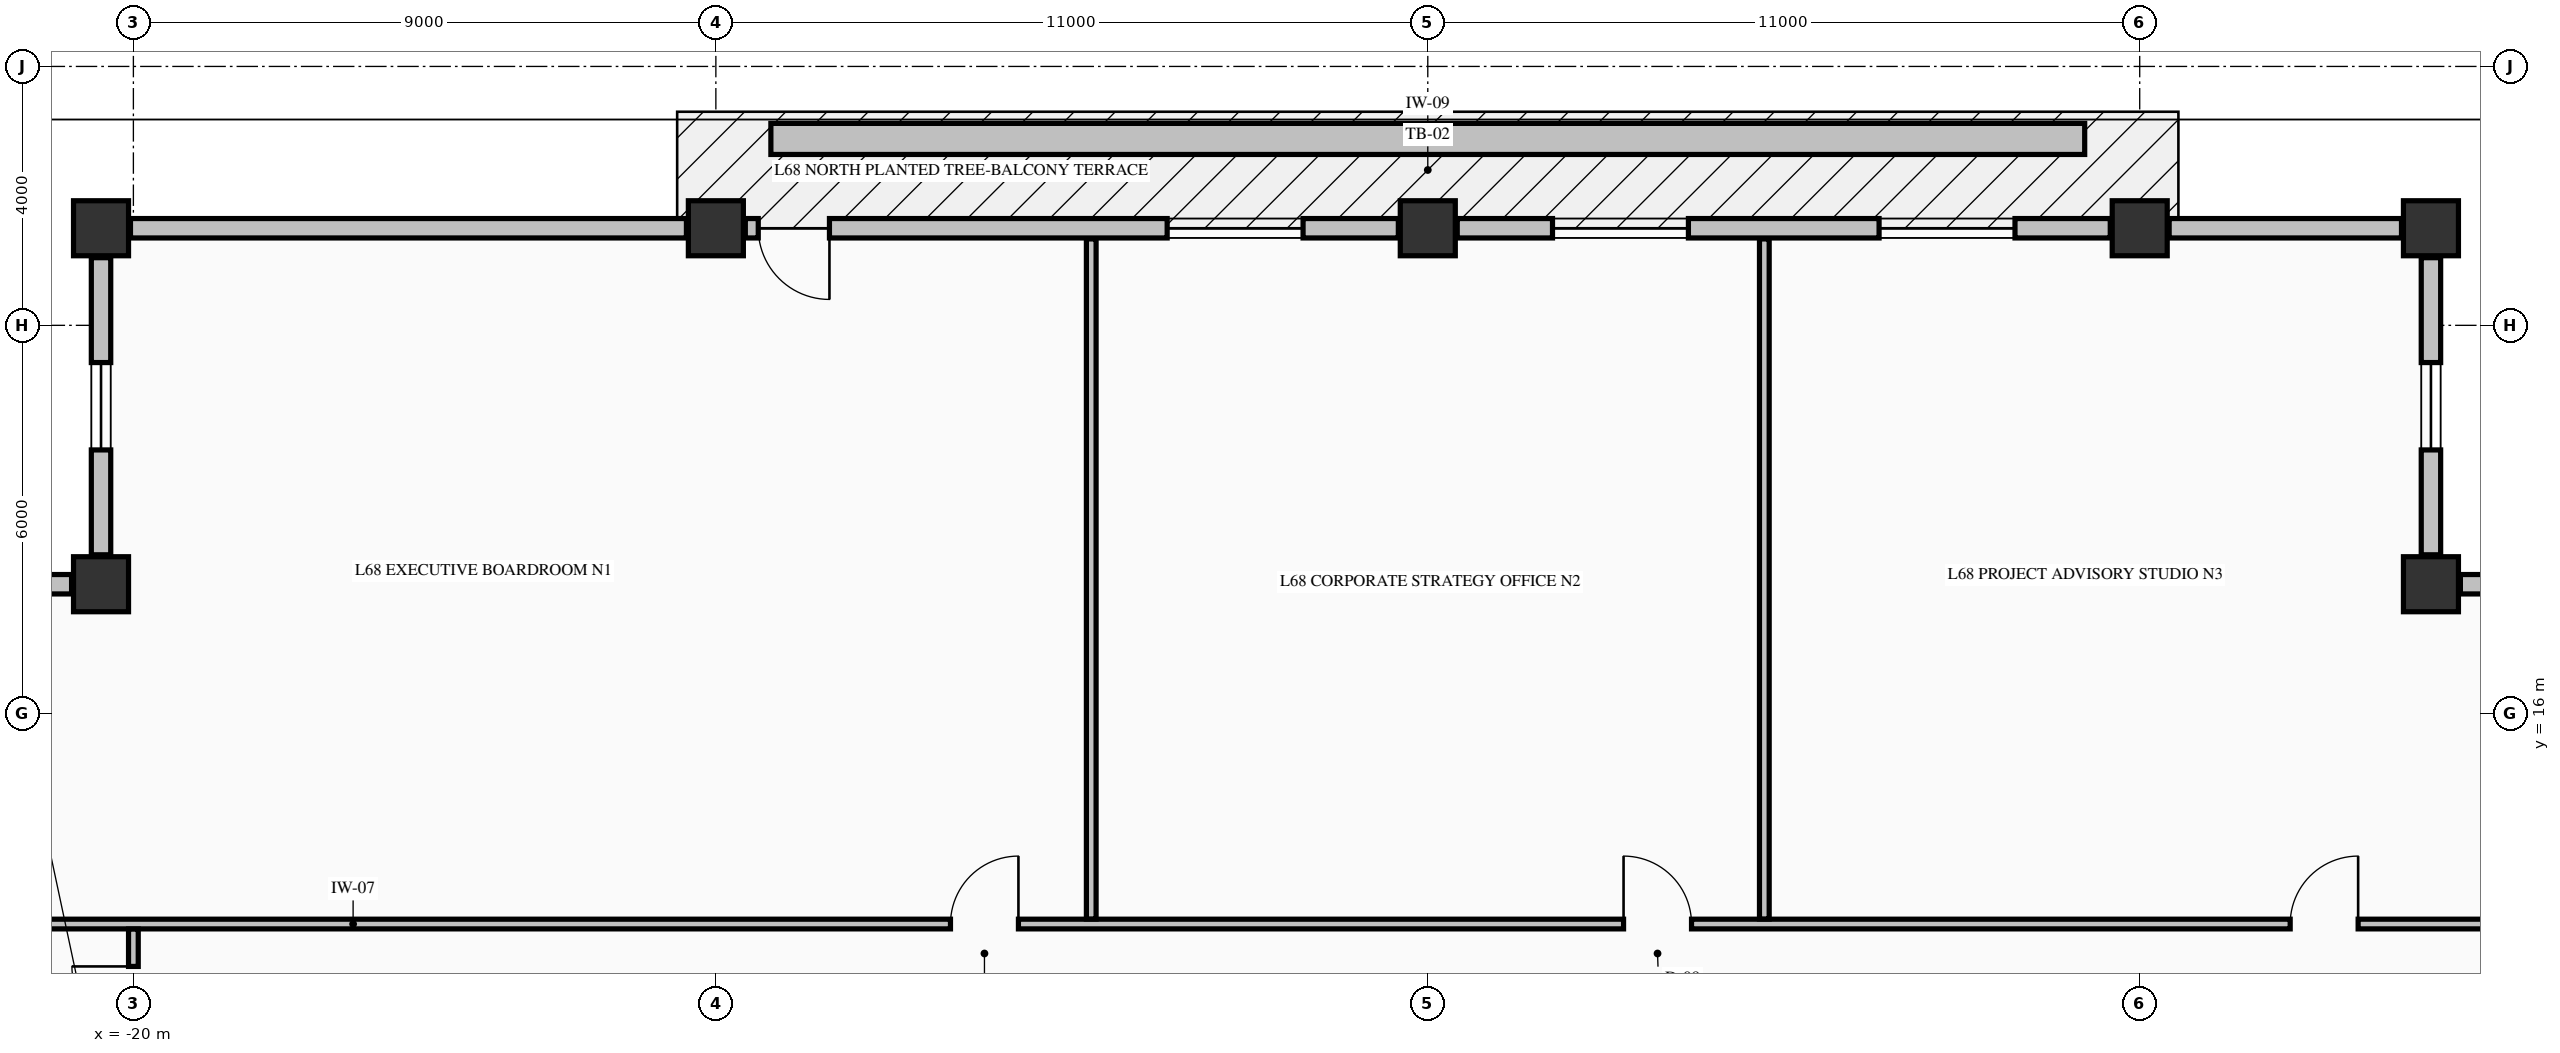
"""IFC4 building model, lengths in metres.
Left out: names, types, materials, properties, quantities, classifications, styles, units other than length and angle.
Written with IfcOpenShell. Run it as: python <this file> out.ifc"""

import sys

from ifc_helpers import new_model, si_unit, direction, frame, frame_2d, origin, origin_2d, place, context, subcontext, project, spatial, rectangle, extrude, element, fill, save


model = new_model("IFC4")
c1 = context("Model", 3, precision=1e-05, world=origin(), true_north=direction((0.0, 1.0)))
c2 = subcontext(c1, "Body", "Model", "MODEL_VIEW")
j1 = project(units=[si_unit("LENGTHUNIT", "METRE"), si_unit("PLANEANGLEUNIT", "RADIAN")], contexts=[c1])
p1 = place(None, origin())
s1 = spatial("IfcSite", under=j1, at=p1, CompositionType="ELEMENT")
p2 = place(p1, origin())
s2 = spatial("IfcBuilding", under=s1, at=p2, CompositionType="ELEMENT")
p3 = place(p2, frame((0.0, 0.0, 257.66)))
s3 = spatial("IfcBuildingStorey", under=s2, at=p3, CompositionType="ELEMENT", Elevation=257.66)
for number, where, z_axis, x_axis in (
    (1, (-20.5, 23.5, -0.25), (0.0, 0.0, 1.0), (1.0, 0.0, 0.0)),
    (2, (-11.0, 23.5, -0.25), (0.0, 0.0, 1.0), (1.0, 0.0, 0.0)),
    (3, (0.0, 23.5, -0.25), (0.0, 0.0, 1.0), (1.0, 0.0, 0.0)),
    (4, (11.0, 23.5, -0.25), (0.0, 0.0, 1.0), (1.0, 0.0, 0.0)),
    (5, (15.5, 23.5, -0.25), (0.0, 0.0, 1.0), (1.0, 0.0, 0.0)),
    (6, (15.5, 18.0, -0.25), (0.0, 0.0, 1.0), (1.0, 0.0, 0.0)),
    (7, (-20.5, 18.0, -0.25), (0.0, 0.0, 1.0), (1.0, 0.0, 0.0)),
):
    element("IfcColumn", number, at=place(p3, frame(where, z_axis=z_axis, x_axis=x_axis)), inside=s3, PredefinedType="COLUMN", context=c2, shape_type="SweptSolid", body=[
        extrude(rectangle(XDim=0.85, YDim=0.85, at=origin_2d()), origin(), (0.0, 0.0, 1.0), 3.23),
    ])
p4 = place(p3, frame((20.545, 18.0, 0.0), z_axis=(0.0, 0.0, 1.0), x_axis=(-1.0, 0.0, 0.0)))
e8 = element("IfcWall", 8, at=p4, inside=s3, PredefinedType="STANDARD", context=c2, shape_type="SweptSolid", body=[
    extrude(rectangle(XDim=4.59, YDim=0.3, at=frame_2d((2.295, 0.0))), origin(), (0.0, 0.0, 1.0), 2.372),
])
p5 = place(p4, frame((1.62, 0.0, 0.68)))
e9 = element("IfcOpeningElement", 9, at=p5, cuts=e8, PredefinedType="OPENING", context=c2, shape_type="SweptSolid", body=[
    extrude(rectangle(XDim=1.35, YDim=1.42, at=frame_2d((0.675, 0.71))), frame((0.0, 0.16, 0.0), z_axis=(0.0, -1.0, 0.0), x_axis=(1.0, 0.0, 0.0)), (0.0, 0.0, 1.0), 0.32),
])
p6 = place(p3, frame((15.5, 18.455, 0.0), z_axis=(0.0, 0.0, 1.0), x_axis=(0.0, 1.0, 0.0)))
e10 = element("IfcWall", 10, at=p6, inside=s3, PredefinedType="STANDARD", context=c2, shape_type="SweptSolid", body=[
    extrude(rectangle(XDim=4.59, YDim=0.3, at=frame_2d((2.295, 0.0))), origin(), (0.0, 0.0, 1.0), 2.372),
])
p7 = place(p6, frame((1.62, 0.0, 0.68)))
e11 = element("IfcOpeningElement", 11, at=p7, cuts=e10, PredefinedType="OPENING", context=c2, shape_type="SweptSolid", body=[
    extrude(rectangle(XDim=1.35, YDim=1.42, at=frame_2d((0.675, 0.71))), frame((0.0, 0.16, 0.0), z_axis=(0.0, -1.0, 0.0), x_axis=(1.0, 0.0, 0.0)), (0.0, 0.0, 1.0), 0.32),
])
p8 = place(p3, frame((-20.5, 23.045, 0.0), z_axis=(0.0, 0.0, 1.0), x_axis=(0.0, -1.0, 0.0)))
e12 = element("IfcWall", 12, at=p8, inside=s3, PredefinedType="STANDARD", context=c2, shape_type="SweptSolid", body=[
    extrude(rectangle(XDim=4.59, YDim=0.3, at=frame_2d((2.295, 0.0))), origin(), (0.0, 0.0, 1.0), 2.372),
])
p9 = place(p8, frame((1.62, 0.0, 0.68)))
e13 = element("IfcOpeningElement", 13, at=p9, cuts=e12, PredefinedType="OPENING", context=c2, shape_type="SweptSolid", body=[
    extrude(rectangle(XDim=1.35, YDim=1.42, at=frame_2d((0.675, 0.71))), frame((0.0, 0.16, 0.0), z_axis=(0.0, -1.0, 0.0), x_axis=(1.0, 0.0, 0.0)), (0.0, 0.0, 1.0), 0.32),
])
p10 = place(p3, frame((-20.955, 18.0, 0.0), z_axis=(0.0, 0.0, 1.0), x_axis=(-1.0, 0.0, 0.0)))
e14 = element("IfcWall", 14, at=p10, inside=s3, PredefinedType="STANDARD", context=c2, shape_type="SweptSolid", body=[
    extrude(rectangle(XDim=4.59, YDim=0.3, at=frame_2d((2.295, 0.0))), origin(), (0.0, 0.0, 1.0), 2.372),
])
p11 = place(p10, frame((1.62, 0.0, 0.68)))
e15 = element("IfcOpeningElement", 15, at=p11, cuts=e14, PredefinedType="OPENING", context=c2, shape_type="SweptSolid", body=[
    extrude(rectangle(XDim=1.35, YDim=1.42, at=frame_2d((0.675, 0.71))), frame((0.0, 0.16, 0.0), z_axis=(0.0, -1.0, 0.0), x_axis=(1.0, 0.0, 0.0)), (0.0, 0.0, 1.0), 0.32),
])
p12 = place(p3, frame((-11.455, 23.5, 0.0), z_axis=(0.0, 0.0, 1.0), x_axis=(-1.0, 0.0, 0.0)))
e16 = element("IfcWall", 16, at=p12, inside=s3, PredefinedType="STANDARD", context=c2, shape_type="SweptSolid", body=[
    extrude(rectangle(XDim=8.59, YDim=0.3, at=frame_2d((4.295, 0.0))), origin(), (0.0, 0.0, 1.0), 2.372),
])
p13 = place(p3, frame((-0.455, 23.5, 0.0), z_axis=(0.0, 0.0, 1.0), x_axis=(-1.0, 0.0, 0.0)))
e17 = element("IfcWall", 17, at=p13, inside=s3, PredefinedType="STANDARD", context=c2, shape_type="SweptSolid", body=[
    extrude(rectangle(XDim=10.09, YDim=0.3, at=frame_2d((5.045, 0.0))), origin(), (0.0, 0.0, 1.0), 2.372),
])
p14 = place(p13, frame((8.79, 0.0, 0.0)))
e18 = element("IfcOpeningElement", 18, at=p14, cuts=e17, PredefinedType="OPENING", context=c2, shape_type="SweptSolid", body=[
    extrude(rectangle(XDim=1.1, YDim=2.15, at=frame_2d((0.55, 1.075))), frame((0.0, 0.16, 0.0), z_axis=(0.0, -1.0, 0.0), x_axis=(1.0, 0.0, 0.0)), (0.0, 0.0, 1.0), 0.32),
])
p15 = place(p13, frame((1.472, 0.0, 0.7)))
e19 = element("IfcOpeningElement", 19, at=p15, cuts=e17, PredefinedType="OPENING", context=c2, shape_type="SweptSolid", body=[
    extrude(rectangle(XDim=2.1, YDim=1.5, at=frame_2d((1.05, 0.75))), frame((0.0, 0.16, 0.0), z_axis=(0.0, -1.0, 0.0), x_axis=(1.0, 0.0, 0.0)), (0.0, 0.0, 1.0), 0.32),
])
p16 = place(p3, frame((10.545, 23.5, 0.0), z_axis=(0.0, 0.0, 1.0), x_axis=(-1.0, 0.0, 0.0)))
e20 = element("IfcWall", 20, at=p16, inside=s3, PredefinedType="STANDARD", context=c2, shape_type="SweptSolid", body=[
    extrude(rectangle(XDim=10.09, YDim=0.3, at=frame_2d((5.045, 0.0))), origin(), (0.0, 0.0, 1.0), 2.372),
])
p17 = place(p16, frame((1.472, 0.0, 0.7)))
e21 = element("IfcOpeningElement", 21, at=p17, cuts=e20, PredefinedType="OPENING", context=c2, shape_type="SweptSolid", body=[
    extrude(rectangle(XDim=2.1, YDim=1.5, at=frame_2d((1.05, 0.75))), frame((0.0, 0.16, 0.0), z_axis=(0.0, -1.0, 0.0), x_axis=(1.0, 0.0, 0.0)), (0.0, 0.0, 1.0), 0.32),
])
p18 = place(p16, frame((6.518, 0.0, 0.7)))
e22 = element("IfcOpeningElement", 22, at=p18, cuts=e20, PredefinedType="OPENING", context=c2, shape_type="SweptSolid", body=[
    extrude(rectangle(XDim=2.1, YDim=1.5, at=frame_2d((1.05, 0.75))), frame((0.0, 0.16, 0.0), z_axis=(0.0, -1.0, 0.0), x_axis=(1.0, 0.0, 0.0)), (0.0, 0.0, 1.0), 0.32),
])
p19 = place(p3, frame((15.045, 23.5, 0.0), z_axis=(0.0, 0.0, 1.0), x_axis=(-1.0, 0.0, 0.0)))
e23 = element("IfcWall", 23, at=p19, inside=s3, PredefinedType="STANDARD", context=c2, shape_type="SweptSolid", body=[
    extrude(rectangle(XDim=3.59, YDim=0.3, at=frame_2d((1.795, 0.0))), origin(), (0.0, 0.0, 1.0), 2.372),
])
p20 = place(p3, frame((-25.835, 12.75, 0.0), z_axis=(0.0, 0.0, 1.0), x_axis=(1.0, 0.0, 0.0)))
e24 = element("IfcWall", 24, at=p20, inside=s3, PredefinedType="PARTITIONING", context=c2, shape_type="SweptSolid", body=[
    extrude(rectangle(XDim=45.91, YDim=0.15, at=frame_2d((22.955, 0.0))), origin(), (0.0, 0.0, 1.0), 2.98),
])
p21 = place(p20, frame((18.46, 0.0, 0.0)))
e25 = element("IfcOpeningElement", 25, at=p21, cuts=e24, PredefinedType="OPENING", context=c2, shape_type="SweptSolid", body=[
    extrude(rectangle(XDim=1.05, YDim=2.15, at=frame_2d((0.525, 1.075))), frame((0.0, 0.085, 0.0), z_axis=(0.0, -1.0, 0.0), x_axis=(1.0, 0.0, 0.0)), (0.0, 0.0, 1.0), 0.17),
])
p22 = place(p20, frame((28.86, 0.0, 0.0)))
e26 = element("IfcOpeningElement", 26, at=p22, cuts=e24, PredefinedType="OPENING", context=c2, shape_type="SweptSolid", body=[
    extrude(rectangle(XDim=1.05, YDim=2.15, at=frame_2d((0.525, 1.075))), frame((0.0, 0.085, 0.0), z_axis=(0.0, -1.0, 0.0), x_axis=(1.0, 0.0, 0.0)), (0.0, 0.0, 1.0), 0.17),
])
p23 = place(p20, frame((39.16, 0.0, 0.0)))
e27 = element("IfcOpeningElement", 27, at=p23, cuts=e24, PredefinedType="OPENING", context=c2, shape_type="SweptSolid", body=[
    extrude(rectangle(XDim=1.05, YDim=2.15, at=frame_2d((0.525, 1.075))), frame((0.0, 0.085, 0.0), z_axis=(0.0, -1.0, 0.0), x_axis=(1.0, 0.0, 0.0)), (0.0, 0.0, 1.0), 0.17),
])
p24 = place(p3, frame((-20.0, 10.856, 0.0), z_axis=(0.0, 0.0, 1.0), x_axis=(0.0, 1.0, 0.0)))
e28 = element("IfcWall", 28, at=p24, inside=s3, PredefinedType="PARTITIONING", context=c2, shape_type="SweptSolid", body=[
    extrude(rectangle(XDim=1.816, YDim=0.15, at=frame_2d((0.908, 0.0))), origin(), (0.0, 0.0, 1.0), 2.98),
])
p25 = place(p24, frame((0.289, 0.0, 0.0)))
e29 = element("IfcOpeningElement", 29, at=p25, cuts=e28, PredefinedType="OPENING", context=c2, shape_type="SweptSolid", body=[
    extrude(rectangle(XDim=0.95, YDim=2.15, at=frame_2d((0.475, 1.075))), frame((0.0, 0.085, 0.0), z_axis=(0.0, -1.0, 0.0), x_axis=(1.0, 0.0, 0.0)), (0.0, 0.0, 1.0), 0.17),
])
for number, where, z_axis, x_axis in (
    (30, (-5.2, 12.828, 0.0), (0.0, 0.0, 1.0), (0.0, 1.0, 0.0)),
    (31, (5.2, 12.828, 0.0), (0.0, 0.0, 1.0), (0.0, 1.0, 0.0)),
):
    element("IfcWall", number, at=place(p3, frame(where, z_axis=z_axis, x_axis=x_axis)), inside=s3, PredefinedType="PARTITIONING", context=c2, shape_type="SweptSolid", body=[
        extrude(rectangle(XDim=10.507, YDim=0.15, at=frame_2d((5.253, 0.0))), origin(), (0.0, 0.0, 1.0), 2.98),
    ])
p26 = place(p3, frame((-10.15, 24.88, -0.04), z_axis=(0.0, 0.0, 1.0), x_axis=(1.0, 0.0, 0.0)))
e32 = element("IfcWall", 32, at=p26, inside=s3, PredefinedType="PARAPET", context=c2, shape_type="SweptSolid", body=[
    extrude(rectangle(XDim=20.3, YDim=0.48, at=frame_2d((10.15, 0.0))), origin(), (0.0, 0.0, 1.0), 0.52),
])
p27 = place(p7, origin())
e33 = element("IfcWindow", 33, at=p27, inside=s3, PartitioningType="SINGLE_PANEL", PredefinedType="WINDOW", context=c2, shape_type="SweptSolid", body=[
    extrude(rectangle(XDim=1.35, YDim=1.42, at=frame_2d((0.675, 0.71))), frame((0.0, 0.03, 0.0), z_axis=(0.0, -1.0, 0.0), x_axis=(1.0, 0.0, 0.0)), (0.0, 0.0, 1.0), 0.06),
])
fill(e11, e33)
p28 = place(p9, origin())
e34 = element("IfcWindow", 34, at=p28, inside=s3, PartitioningType="SINGLE_PANEL", PredefinedType="WINDOW", context=c2, shape_type="SweptSolid", body=[
    extrude(rectangle(XDim=1.35, YDim=1.42, at=frame_2d((0.675, 0.71))), frame((0.0, 0.03, 0.0), z_axis=(0.0, -1.0, 0.0), x_axis=(1.0, 0.0, 0.0)), (0.0, 0.0, 1.0), 0.06),
])
fill(e13, e34)
p29 = place(p14, origin())
e35 = element("IfcDoor", 35, at=p29, inside=s3, OperationType="SINGLE_SWING_LEFT", PredefinedType="DOOR", context=c2, shape_type="SweptSolid", body=[
    extrude(rectangle(XDim=1.1, YDim=2.15, at=frame_2d((0.55, 1.075))), frame((0.0, 0.025, 0.0), z_axis=(0.0, -1.0, 0.0), x_axis=(1.0, 0.0, 0.0)), (0.0, 0.0, 1.0), 0.05),
])
fill(e18, e35)
p30 = place(p15, origin())
e36 = element("IfcWindow", 36, at=p30, inside=s3, PartitioningType="SINGLE_PANEL", PredefinedType="WINDOW", context=c2, shape_type="SweptSolid", body=[
    extrude(rectangle(XDim=2.1, YDim=1.5, at=frame_2d((1.05, 0.75))), frame((0.0, 0.03, 0.0), z_axis=(0.0, -1.0, 0.0), x_axis=(1.0, 0.0, 0.0)), (0.0, 0.0, 1.0), 0.06),
])
fill(e19, e36)
p31 = place(p17, origin())
e37 = element("IfcWindow", 37, at=p31, inside=s3, PartitioningType="SINGLE_PANEL", PredefinedType="WINDOW", context=c2, shape_type="SweptSolid", body=[
    extrude(rectangle(XDim=2.1, YDim=1.5, at=frame_2d((1.05, 0.75))), frame((0.0, 0.03, 0.0), z_axis=(0.0, -1.0, 0.0), x_axis=(1.0, 0.0, 0.0)), (0.0, 0.0, 1.0), 0.06),
])
fill(e21, e37)
p32 = place(p18, origin())
e38 = element("IfcWindow", 38, at=p32, inside=s3, PartitioningType="SINGLE_PANEL", PredefinedType="WINDOW", context=c2, shape_type="SweptSolid", body=[
    extrude(rectangle(XDim=2.1, YDim=1.5, at=frame_2d((1.05, 0.75))), frame((0.0, 0.03, 0.0), z_axis=(0.0, -1.0, 0.0), x_axis=(1.0, 0.0, 0.0)), (0.0, 0.0, 1.0), 0.06),
])
fill(e22, e38)
p33 = place(p21, origin())
e39 = element("IfcDoor", 39, at=p33, inside=s3, OperationType="SINGLE_SWING_RIGHT", PredefinedType="DOOR", context=c2, shape_type="SweptSolid", body=[
    extrude(rectangle(XDim=1.05, YDim=2.15, at=frame_2d((0.525, 1.075))), frame((0.0, 0.025, 0.0), z_axis=(0.0, -1.0, 0.0), x_axis=(1.0, 0.0, 0.0)), (0.0, 0.0, 1.0), 0.05),
])
fill(e25, e39)
p34 = place(p22, origin())
e40 = element("IfcDoor", 40, at=p34, inside=s3, OperationType="SINGLE_SWING_LEFT", PredefinedType="DOOR", context=c2, shape_type="SweptSolid", body=[
    extrude(rectangle(XDim=1.05, YDim=2.15, at=frame_2d((0.525, 1.075))), frame((0.0, 0.025, 0.0), z_axis=(0.0, -1.0, 0.0), x_axis=(1.0, 0.0, 0.0)), (0.0, 0.0, 1.0), 0.05),
])
fill(e26, e40)
p35 = place(p23, origin())
e41 = element("IfcDoor", 41, at=p35, inside=s3, OperationType="SINGLE_SWING_RIGHT", PredefinedType="DOOR", context=c2, shape_type="SweptSolid", body=[
    extrude(rectangle(XDim=1.05, YDim=2.15, at=frame_2d((0.525, 1.075))), frame((0.0, 0.025, 0.0), z_axis=(0.0, -1.0, 0.0), x_axis=(1.0, 0.0, 0.0)), (0.0, 0.0, 1.0), 0.05),
])
fill(e27, e41)
p36 = place(p25, origin())
e42 = element("IfcDoor", 42, at=p36, inside=s3, OperationType="SINGLE_SWING_RIGHT", PredefinedType="DOOR", context=c2, shape_type="SweptSolid", body=[
    extrude(rectangle(XDim=0.95, YDim=2.15, at=frame_2d((0.475, 1.075))), frame((0.0, 0.025, 0.0), z_axis=(0.0, -1.0, 0.0), x_axis=(1.0, 0.0, 0.0)), (0.0, 0.0, 1.0), 0.05),
])
fill(e29, e42)
save(model, sys.argv[1])
